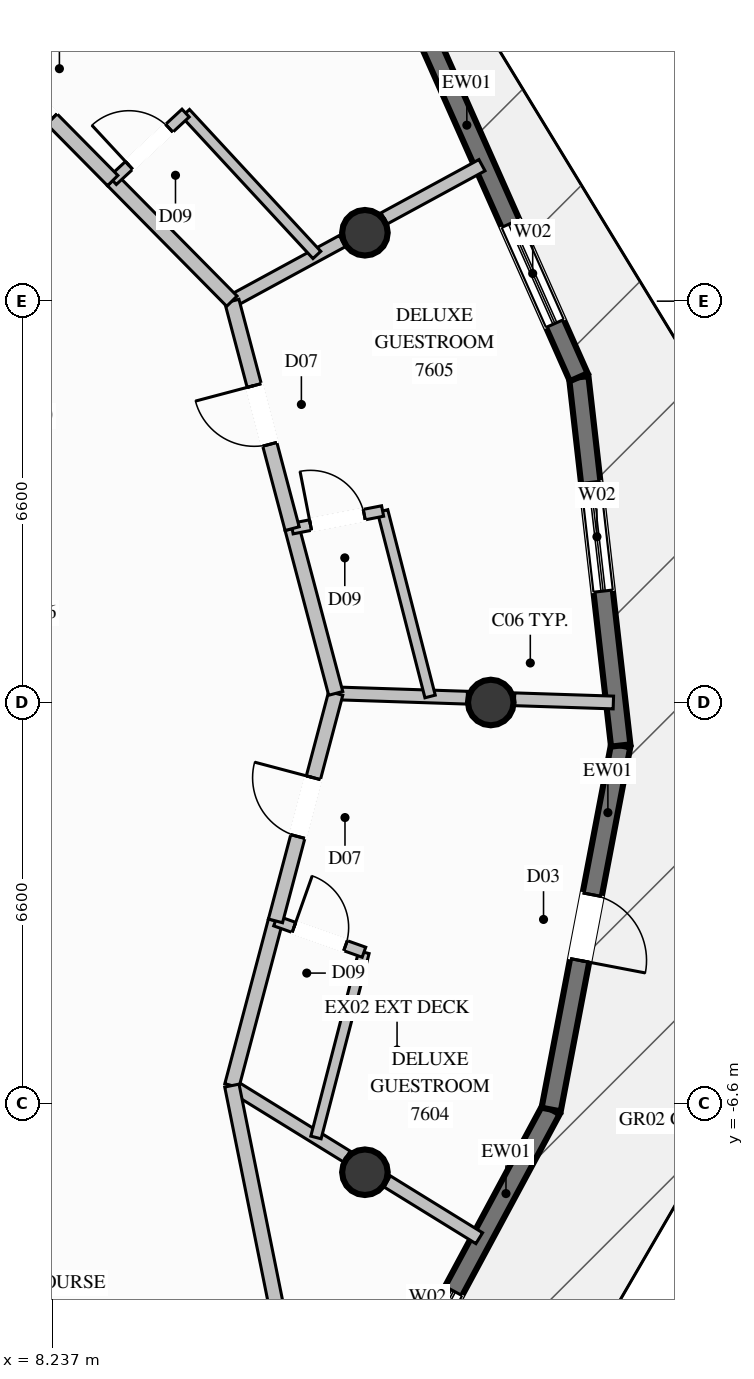
"""IFC4 building model, lengths in metres.
Left out: names, types, materials, properties, quantities, classifications, styles, units other than length and angle.
Written with IfcOpenShell. Run it as: python <this file> out.ifc"""

import sys

from ifc_helpers import new_model, si_unit, direction, frame, frame_2d, origin, origin_2d, place, context, subcontext, project, spatial, rectangle, circle, extrude, element, fill, save


model = new_model("IFC4")
c1 = context("Model", 3, precision=1e-05, world=origin(), true_north=direction((0.0, 1.0)))
c2 = subcontext(c1, "Body", "Model", "MODEL_VIEW")
j1 = project(units=[si_unit("LENGTHUNIT", "METRE"), si_unit("PLANEANGLEUNIT", "RADIAN")], contexts=[c1])
p1 = place(None, origin())
s1 = spatial("IfcSite", under=j1, at=p1, CompositionType="ELEMENT")
p2 = place(p1, origin())
s2 = spatial("IfcBuilding", under=s1, at=p2, CompositionType="ELEMENT")
p3 = place(p2, frame((0.0, 0.0, 285.8)))
s3 = spatial("IfcBuildingStorey", under=s2, at=p3, CompositionType="ELEMENT", Elevation=285.8)
for number, where, z_axis, x_axis in (
    (1, (15.45, 0.0, 0.0), (0.0, 0.0, 1.0), (1.0, 0.0, 0.0)),
    (2, (13.38, 7.725, 0.0), (0.0, 0.0, 1.0), (1.0, 0.0, 0.0)),
    (3, (13.38, -7.725, 0.0), (0.0, 0.0, 1.0), (1.0, 0.0, 0.0)),
):
    element("IfcColumn", number, at=place(p3, frame(where, z_axis=z_axis, x_axis=x_axis)), inside=s3, PredefinedType="COLUMN", context=c2, shape_type="SweptSolid", body=[
        extrude(circle(Radius=0.375, at=origin_2d()), origin(), (0.0, 0.0, 1.0), 3.8),
    ])
p4 = place(p3, frame((16.443, -6.694, 0.0), z_axis=(0.0, 0.0, 1.0), x_axis=(-0.4736836628, -0.880695059369, 0.0)))
e4 = element("IfcWall", 4, at=p4, inside=s3, PredefinedType="SOLIDWALL", context=c2, shape_type="SweptSolid", body=[
    extrude(rectangle(XDim=6.053, YDim=0.32, at=frame_2d((3.026, 0.0))), origin(), (0.0, 0.0, 1.0), 3.57),
])
p5 = place(p4, frame((3.388, 0.0, 0.35)))
e5 = element("IfcOpeningElement", 5, at=p5, cuts=e4, PredefinedType="OPENING", context=c2, shape_type="SweptSolid", body=[
    extrude(rectangle(XDim=1.8, YDim=2.6, at=frame_2d((0.9, 1.3))), frame((0.0, 0.17, 0.0), z_axis=(0.0, -1.0, 0.0), x_axis=(1.0, 0.0, 0.0)), (0.0, 0.0, 1.0), 0.34),
])
p6 = place(p3, frame((17.587, -0.707, 0.0), z_axis=(0.0, 0.0, 1.0), x_axis=(-0.187651357853, -0.982235698748, 0.0)))
e6 = element("IfcWall", 6, at=p6, inside=s3, PredefinedType="SOLIDWALL", context=c2, shape_type="SweptSolid", body=[
    extrude(rectangle(XDim=6.095, YDim=0.32, at=frame_2d((3.048, 0.0))), origin(), (0.0, 0.0, 1.0), 3.57),
])
p7 = place(p6, frame((2.498, 0.0, 0.0)))
e7 = element("IfcOpeningElement", 7, at=p7, cuts=e6, PredefinedType="OPENING", context=c2, shape_type="SweptSolid", body=[
    extrude(rectangle(XDim=1.1, YDim=2.2, at=frame_2d((0.55, 1.1))), frame((0.0, 0.17, 0.0), z_axis=(0.0, -1.0, 0.0), x_axis=(1.0, 0.0, 0.0)), (0.0, 0.0, 1.0), 0.34),
])
p8 = place(p3, frame((16.897, 5.349, 0.0), z_axis=(0.0, 0.0, 1.0), x_axis=(0.113191877531, -0.993573147212, 0.0)))
e8 = element("IfcWall", 8, at=p8, inside=s3, PredefinedType="SOLIDWALL", context=c2, shape_type="SweptSolid", body=[
    extrude(rectangle(XDim=6.095, YDim=0.32, at=frame_2d((3.048, 0.0))), origin(), (0.0, 0.0, 1.0), 3.57),
])
p9 = place(p8, frame((1.74, 0.0, 0.35)))
e9 = element("IfcOpeningElement", 9, at=p9, cuts=e8, PredefinedType="OPENING", context=c2, shape_type="SweptSolid", body=[
    extrude(rectangle(XDim=1.8, YDim=2.6, at=frame_2d((0.9, 1.3))), frame((0.0, 0.17, 0.0), z_axis=(0.0, -1.0, 0.0), x_axis=(1.0, 0.0, 0.0)), (0.0, 0.0, 1.0), 0.34),
])
p10 = place(p3, frame((14.44, 10.882, 0.0), z_axis=(0.0, 0.0, 1.0), x_axis=(0.405854076471, -0.913937891004, 0.0)))
e10 = element("IfcWall", 10, at=p10, inside=s3, PredefinedType="SOLIDWALL", context=c2, shape_type="SweptSolid", body=[
    extrude(rectangle(XDim=6.054, YDim=0.32, at=frame_2d((3.027, 0.0))), origin(), (0.0, 0.0, 1.0), 3.57),
])
p11 = place(p10, frame((3.287, 0.0, 0.35)))
e11 = element("IfcOpeningElement", 11, at=p11, cuts=e10, PredefinedType="OPENING", context=c2, shape_type="SweptSolid", body=[
    extrude(rectangle(XDim=1.8, YDim=2.6, at=frame_2d((0.9, 1.3))), frame((0.0, 0.17, 0.0), z_axis=(0.0, -1.0, 0.0), x_axis=(1.0, 0.0, 0.0)), (0.0, 0.0, 1.0), 0.34),
])
p12 = place(p3, frame((12.9, 0.15, 0.0), z_axis=(0.0, 0.0, 1.0), x_axis=(0.999464758513, -0.032713857784, 0.0)))
e12 = element("IfcWall", 12, at=p12, inside=s3, PredefinedType="PARTITIONING", context=c2, shape_type="SweptSolid", body=[
    extrude(rectangle(XDim=2.164, YDim=0.21, at=frame_2d((1.082, 0.0))), origin(), (0.0, 0.0, 1.0), 3.57),
])
p13 = place(p3, frame((15.841, 0.053, 0.0), z_axis=(0.0, 0.0, 1.0), x_axis=(0.999468972753, -0.032584850824, 0.0)))
e13 = element("IfcWall", 13, at=p13, inside=s3, PredefinedType="PARTITIONING", context=c2, shape_type="SweptSolid", body=[
    extrude(rectangle(XDim=1.626, YDim=0.21, at=frame_2d((0.813, 0.0))), origin(), (0.0, 0.0, 1.0), 3.57),
])
p14 = place(p3, frame((11.192, 6.6, 0.0), z_axis=(0.0, 0.0, 1.0), x_axis=(0.878580364195, 0.477594538967, 0.0)))
e14 = element("IfcWall", 14, at=p14, inside=s3, PredefinedType="PARTITIONING", context=c2, shape_type="SweptSolid", body=[
    extrude(rectangle(XDim=2.068, YDim=0.21, at=frame_2d((1.034, 0.0))), origin(), (0.0, 0.0, 1.0), 3.011),
])
p15 = place(p3, frame((13.696, 7.961, 0.0), z_axis=(0.0, 0.0, 1.0), x_axis=(0.87848586555, 0.477768337198, 0.0)))
e15 = element("IfcWall", 15, at=p15, inside=s3, PredefinedType="PARTITIONING", context=c2, shape_type="SweptSolid", body=[
    extrude(rectangle(XDim=1.832, YDim=0.21, at=frame_2d((0.916, 0.0))), origin(), (0.0, 0.0, 1.0), 3.57),
])
p16 = place(p3, frame((11.192, -6.3, 0.0), z_axis=(0.0, 0.0, 1.0), x_axis=(0.851084090432, -0.525029400142, 0.0)))
e16 = element("IfcWall", 16, at=p16, inside=s3, PredefinedType="PARTITIONING", context=c2, shape_type="SweptSolid", body=[
    extrude(rectangle(XDim=2.221, YDim=0.21, at=frame_2d((1.11, 0.0))), origin(), (0.0, 0.0, 1.0), 3.011),
])
p17 = place(p3, frame((13.745, -7.875, 0.0), z_axis=(0.0, 0.0, 1.0), x_axis=(0.850951244942, -0.52524468463, 0.0)))
e17 = element("IfcWall", 17, at=p17, inside=s3, PredefinedType="PARTITIONING", context=c2, shape_type="SweptSolid", body=[
    extrude(rectangle(XDim=1.78, YDim=0.21, at=frame_2d((0.89, 0.0))), origin(), (0.0, 0.0, 1.0), 3.57),
])
p18 = place(p3, frame((11.192, -6.3, 0.0), z_axis=(0.0, 0.0, 1.0), x_axis=(0.255878192504, 0.966709030992, 0.0)))
e18 = element("IfcWall", 18, at=p18, inside=s3, PredefinedType="PARTITIONING", context=c2, shape_type="SweptSolid", body=[
    extrude(rectangle(XDim=2.802, YDim=0.24, at=frame_2d((1.401, 0.0))), origin(), (0.0, 0.0, 1.0), 3.57),
])
p19 = place(p3, frame((12.575, -7.153, 0.0), z_axis=(0.0, 0.0, 1.0), x_axis=(0.25076020851, 0.968049233163, 0.0)))
e19 = element("IfcWall", 19, at=p19, inside=s3, PredefinedType="PLUMBINGWALL", context=c2, shape_type="SweptSolid", body=[
    extrude(rectangle(XDim=3.147, YDim=0.175, at=frame_2d((1.573, 0.0))), origin(), (0.0, 0.0, 1.0), 3.57),
])
p20 = place(p3, frame((11.909, -3.591, 0.0), z_axis=(0.0, 0.0, 1.0), x_axis=(0.94251934993, -0.3341515749, 0.0)))
e20 = element("IfcWall", 20, at=p20, inside=s3, PredefinedType="PLUMBINGWALL", context=c2, shape_type="SweptSolid", body=[
    extrude(rectangle(XDim=1.544, YDim=0.175, at=frame_2d((0.772, 0.0))), origin(), (0.0, 0.0, 1.0), 3.57),
])
p21 = place(p20, frame((0.322, 0.0, 0.0)))
e21 = element("IfcOpeningElement", 21, at=p21, cuts=e20, PredefinedType="OPENING", context=c2, shape_type="SweptSolid", body=[
    extrude(rectangle(XDim=0.9, YDim=2.1, at=frame_2d((0.45, 1.05))), frame((0.0, 0.098, 0.0), z_axis=(0.0, -1.0, 0.0), x_axis=(1.0, 0.0, 0.0)), (0.0, 0.0, 1.0), 0.195),
])
p22 = place(p3, frame((11.909, -3.591, 0.0), z_axis=(0.0, 0.0, 1.0), x_axis=(0.256064218317, 0.96665977267, 0.0)))
e22 = element("IfcWall", 22, at=p22, inside=s3, PredefinedType="PARTITIONING", context=c2, shape_type="SweptSolid", body=[
    extrude(rectangle(XDim=3.87, YDim=0.24, at=frame_2d((1.935, 0.0))), origin(), (0.0, 0.0, 1.0), 3.57),
])
p23 = place(p22, frame((1.435, 0.0, 0.0)))
e23 = element("IfcOpeningElement", 23, at=p23, cuts=e22, PredefinedType="OPENING", context=c2, shape_type="SweptSolid", body=[
    extrude(rectangle(XDim=1.0, YDim=2.2, at=frame_2d((0.5, 1.1))), frame((0.0, 0.13, 0.0), z_axis=(0.0, -1.0, 0.0), x_axis=(1.0, 0.0, 0.0)), (0.0, 0.0, 1.0), 0.26),
])
p24 = place(p3, frame((12.9, 0.15, 0.0), z_axis=(0.0, 0.0, 1.0), x_axis=(-0.255796771697, 0.966730578594, 0.0)))
e24 = element("IfcWall", 24, at=p24, inside=s3, PredefinedType="PARTITIONING", context=c2, shape_type="SweptSolid", body=[
    extrude(rectangle(XDim=2.802, YDim=0.24, at=frame_2d((1.401, 0.0))), origin(), (0.0, 0.0, 1.0), 3.57),
])
p25 = place(p3, frame((14.452, 0.099, 0.0), z_axis=(0.0, 0.0, 1.0), x_axis=(-0.248078682083, 0.968739886397, 0.0)))
e25 = element("IfcWall", 25, at=p25, inside=s3, PredefinedType="PLUMBINGWALL", context=c2, shape_type="SweptSolid", body=[
    extrude(rectangle(XDim=3.148, YDim=0.175, at=frame_2d((1.574, 0.0))), origin(), (0.0, 0.0, 1.0), 3.57),
])
p26 = place(p3, frame((12.183, 2.859, 0.0), z_axis=(0.0, 0.0, 1.0), x_axis=(0.981523067571, 0.191343847108, 0.0)))
e26 = element("IfcWall", 26, at=p26, inside=s3, PredefinedType="PLUMBINGWALL", context=c2, shape_type="SweptSolid", body=[
    extrude(rectangle(XDim=1.516, YDim=0.175, at=frame_2d((0.758, 0.0))), origin(), (0.0, 0.0, 1.0), 3.57),
])
p27 = place(p26, frame((0.308, 0.0, 0.0)))
e27 = element("IfcOpeningElement", 27, at=p27, cuts=e26, PredefinedType="OPENING", context=c2, shape_type="SweptSolid", body=[
    extrude(rectangle(XDim=0.9, YDim=2.1, at=frame_2d((0.45, 1.05))), frame((0.0, 0.098, 0.0), z_axis=(0.0, -1.0, 0.0), x_axis=(1.0, 0.0, 0.0)), (0.0, 0.0, 1.0), 0.195),
])
p28 = place(p3, frame((12.183, 2.859, 0.0), z_axis=(0.0, 0.0, 1.0), x_axis=(-0.256107548437, 0.966648293659, 0.0)))
e28 = element("IfcWall", 28, at=p28, inside=s3, PredefinedType="PARTITIONING", context=c2, shape_type="SweptSolid", body=[
    extrude(rectangle(XDim=3.87, YDim=0.24, at=frame_2d((1.935, 0.0))), origin(), (0.0, 0.0, 1.0), 3.57),
])
p29 = place(p28, frame((1.435, 0.0, 0.0)))
e29 = element("IfcOpeningElement", 29, at=p29, cuts=e28, PredefinedType="OPENING", context=c2, shape_type="SweptSolid", body=[
    extrude(rectangle(XDim=1.0, YDim=2.2, at=frame_2d((0.5, 1.1))), frame((0.0, 0.13, 0.0), z_axis=(0.0, -1.0, 0.0), x_axis=(1.0, 0.0, 0.0)), (0.0, 0.0, 1.0), 0.26),
])
p30 = place(p3, frame((11.192, 6.6, 0.0), z_axis=(0.0, 0.0, 1.0), x_axis=(-0.702979205765, 0.711210402245, 0.0)))
e30 = element("IfcWall", 30, at=p30, inside=s3, PredefinedType="PARTITIONING", context=c2, shape_type="SweptSolid", body=[
    extrude(rectangle(XDim=2.788, YDim=0.24, at=frame_2d((1.394, 0.0))), origin(), (0.0, 0.0, 1.0), 3.57),
])
p31 = place(p3, frame((12.59, 7.36, 0.0), z_axis=(0.0, 0.0, 1.0), x_axis=(-0.679236484788, 0.733919476327, 0.0)))
e31 = element("IfcWall", 31, at=p31, inside=s3, PredefinedType="PLUMBINGWALL", context=c2, shape_type="SweptSolid", body=[
    extrude(rectangle(XDim=3.179, YDim=0.175, at=frame_2d((1.589, 0.0))), origin(), (0.0, 0.0, 1.0), 3.57),
])
p32 = place(p3, frame((9.232, 8.583, 0.0), z_axis=(0.0, 0.0, 1.0), x_axis=(0.733777226426, 0.679390154461, 0.0)))
e32 = element("IfcWall", 32, at=p32, inside=s3, PredefinedType="PLUMBINGWALL", context=c2, shape_type="SweptSolid", body=[
    extrude(rectangle(XDim=1.634, YDim=0.175, at=frame_2d((0.817, 0.0))), origin(), (0.0, 0.0, 1.0), 3.57),
])
p33 = place(p32, frame((0.367, 0.0, 0.0)))
e33 = element("IfcOpeningElement", 33, at=p33, cuts=e32, PredefinedType="OPENING", context=c2, shape_type="SweptSolid", body=[
    extrude(rectangle(XDim=0.9, YDim=2.1, at=frame_2d((0.45, 1.05))), frame((0.0, 0.098, 0.0), z_axis=(0.0, -1.0, 0.0), x_axis=(1.0, 0.0, 0.0)), (0.0, 0.0, 1.0), 0.195),
])
p34 = place(p3, frame((9.232, 8.583, 0.0), z_axis=(0.0, 0.0, 1.0), x_axis=(-0.702942107486, 0.711247069254, 0.0)))
e34 = element("IfcWall", 34, at=p34, inside=s3, PredefinedType="PARTITIONING", context=c2, shape_type="SweptSolid", body=[
    extrude(rectangle(XDim=3.851, YDim=0.24, at=frame_2d((1.926, 0.0))), origin(), (0.0, 0.0, 1.0), 3.57),
])
p35 = place(p34, frame((1.425, 0.0, 0.0)))
e35 = element("IfcOpeningElement", 35, at=p35, cuts=e34, PredefinedType="OPENING", context=c2, shape_type="SweptSolid", body=[
    extrude(rectangle(XDim=1.0, YDim=2.2, at=frame_2d((0.5, 1.1))), frame((0.0, 0.13, 0.0), z_axis=(0.0, -1.0, 0.0), x_axis=(1.0, 0.0, 0.0)), (0.0, 0.0, 1.0), 0.26),
])
p36 = place(p3, frame((12.3, -11.8, 0.0), z_axis=(0.0, 0.0, 1.0), x_axis=(-0.197513428752, 0.980300181303, 0.0)))
e36 = element("IfcWall", 36, at=p36, inside=s3, PredefinedType="PARTITIONING", context=c2, shape_type="SweptSolid", body=[
    extrude(rectangle(XDim=5.611, YDim=0.24, at=frame_2d((2.805, 0.0))), origin(), (0.0, 0.0, 1.0), 3.57),
])
p37 = place(p5, origin())
e37 = element("IfcWindow", 37, at=p37, inside=s3, PartitioningType="SINGLE_PANEL", PredefinedType="WINDOW", context=c2, shape_type="SweptSolid", body=[
    extrude(rectangle(XDim=1.8, YDim=2.6, at=frame_2d((0.9, 1.3))), frame((0.0, 0.03, 0.0), z_axis=(0.0, -1.0, 0.0), x_axis=(1.0, 0.0, 0.0)), (0.0, 0.0, 1.0), 0.06),
])
fill(e5, e37)
p38 = place(p7, origin())
e38 = element("IfcDoor", 38, at=p38, inside=s3, OperationType="SINGLE_SWING_RIGHT", PredefinedType="DOOR", context=c2, shape_type="SweptSolid", body=[
    extrude(rectangle(XDim=1.1, YDim=2.2, at=frame_2d((0.55, 1.1))), frame((0.0, 0.025, 0.0), z_axis=(0.0, -1.0, 0.0), x_axis=(1.0, 0.0, 0.0)), (0.0, 0.0, 1.0), 0.05),
])
fill(e7, e38)
p39 = place(p9, origin())
e39 = element("IfcWindow", 39, at=p39, inside=s3, PartitioningType="SINGLE_PANEL", PredefinedType="WINDOW", context=c2, shape_type="SweptSolid", body=[
    extrude(rectangle(XDim=1.8, YDim=2.6, at=frame_2d((0.9, 1.3))), frame((0.0, 0.03, 0.0), z_axis=(0.0, -1.0, 0.0), x_axis=(1.0, 0.0, 0.0)), (0.0, 0.0, 1.0), 0.06),
])
fill(e9, e39)
p40 = place(p11, origin())
e40 = element("IfcWindow", 40, at=p40, inside=s3, PartitioningType="SINGLE_PANEL", PredefinedType="WINDOW", context=c2, shape_type="SweptSolid", body=[
    extrude(rectangle(XDim=1.8, YDim=2.6, at=frame_2d((0.9, 1.3))), frame((0.0, 0.03, 0.0), z_axis=(0.0, -1.0, 0.0), x_axis=(1.0, 0.0, 0.0)), (0.0, 0.0, 1.0), 0.06),
])
fill(e11, e40)
p41 = place(p21, origin())
e41 = element("IfcDoor", 41, at=p41, inside=s3, OperationType="SINGLE_SWING_LEFT", PredefinedType="DOOR", context=c2, shape_type="SweptSolid", body=[
    extrude(rectangle(XDim=0.9, YDim=2.1, at=frame_2d((0.45, 1.05))), frame((0.0, 0.025, 0.0), z_axis=(0.0, -1.0, 0.0), x_axis=(1.0, 0.0, 0.0)), (0.0, 0.0, 1.0), 0.05),
])
fill(e21, e41)
p42 = place(p23, origin())
e42 = element("IfcDoor", 42, at=p42, inside=s3, OperationType="SINGLE_SWING_RIGHT", PredefinedType="DOOR", context=c2, shape_type="SweptSolid", body=[
    extrude(rectangle(XDim=1.0, YDim=2.2, at=frame_2d((0.5, 1.1))), frame((0.0, 0.025, 0.0), z_axis=(0.0, -1.0, 0.0), x_axis=(1.0, 0.0, 0.0)), (0.0, 0.0, 1.0), 0.05),
])
fill(e23, e42)
p43 = place(p27, origin())
e43 = element("IfcDoor", 43, at=p43, inside=s3, OperationType="SINGLE_SWING_LEFT", PredefinedType="DOOR", context=c2, shape_type="SweptSolid", body=[
    extrude(rectangle(XDim=0.9, YDim=2.1, at=frame_2d((0.45, 1.05))), frame((0.0, 0.025, 0.0), z_axis=(0.0, -1.0, 0.0), x_axis=(1.0, 0.0, 0.0)), (0.0, 0.0, 1.0), 0.05),
])
fill(e27, e43)
p44 = place(p29, origin())
e44 = element("IfcDoor", 44, at=p44, inside=s3, OperationType="SINGLE_SWING_RIGHT", PredefinedType="DOOR", context=c2, shape_type="SweptSolid", body=[
    extrude(rectangle(XDim=1.0, YDim=2.2, at=frame_2d((0.5, 1.1))), frame((0.0, 0.025, 0.0), z_axis=(0.0, -1.0, 0.0), x_axis=(1.0, 0.0, 0.0)), (0.0, 0.0, 1.0), 0.05),
])
fill(e29, e44)
p45 = place(p33, origin())
e45 = element("IfcDoor", 45, at=p45, inside=s3, OperationType="SINGLE_SWING_LEFT", PredefinedType="DOOR", context=c2, shape_type="SweptSolid", body=[
    extrude(rectangle(XDim=0.9, YDim=2.1, at=frame_2d((0.45, 1.05))), frame((0.0, 0.025, 0.0), z_axis=(0.0, -1.0, 0.0), x_axis=(1.0, 0.0, 0.0)), (0.0, 0.0, 1.0), 0.05),
])
fill(e33, e45)
p46 = place(p35, origin())
e46 = element("IfcDoor", 46, at=p46, inside=s3, OperationType="SINGLE_SWING_RIGHT", PredefinedType="DOOR", context=c2, shape_type="SweptSolid", body=[
    extrude(rectangle(XDim=1.0, YDim=2.2, at=frame_2d((0.5, 1.1))), frame((0.0, 0.025, 0.0), z_axis=(0.0, -1.0, 0.0), x_axis=(1.0, 0.0, 0.0)), (0.0, 0.0, 1.0), 0.05),
])
fill(e35, e46)
save(model, sys.argv[1])
